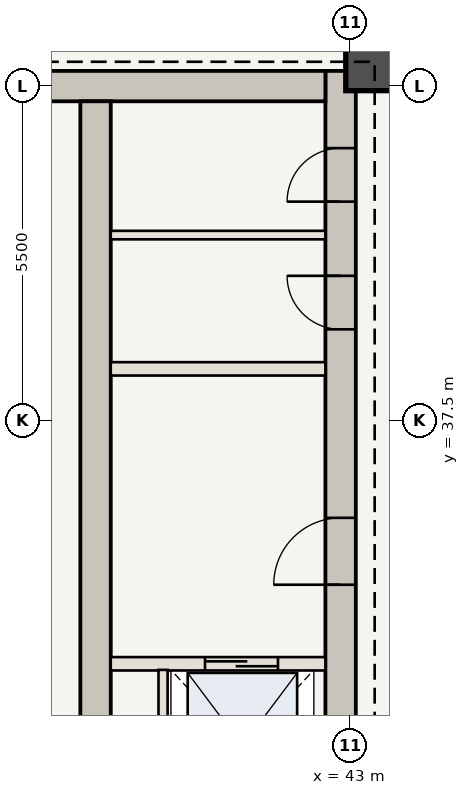
"""IFC4 building model, lengths in metres.
Left out: names, types, materials, properties, quantities, classifications, styles, units other than length and angle.
Written with IfcOpenShell. Run it as: python <this file> out.ifc"""

import sys

from ifc_helpers import new_model, si_unit, direction, frame, frame_2d, origin, origin_2d, place, context, subcontext, project, spatial, rectangle, extrude, element, fill, save


model = new_model("IFC4")
c1 = context("Model", 3, precision=1e-05, world=origin(), true_north=direction((0.0, 1.0)))
c2 = subcontext(c1, "Body", "Model", "MODEL_VIEW")
j1 = project(units=[si_unit("LENGTHUNIT", "METRE"), si_unit("PLANEANGLEUNIT", "RADIAN")], contexts=[c1])
p1 = place(None, origin())
s1 = spatial("IfcSite", under=j1, at=p1, CompositionType="ELEMENT")
p2 = place(p1, origin())
s2 = spatial("IfcBuilding", under=s1, at=p2, CompositionType="ELEMENT")
p3 = place(p2, frame((0.0, 0.0, 233.1)))
s3 = spatial("IfcBuildingStorey", under=s2, at=p3, CompositionType="ELEMENT", Elevation=233.1)
p4 = place(p3, frame((42.84, 30.6, 0.0), z_axis=(0.0, 0.0, 1.0), x_axis=(0.0, 1.0, 0.0)))
e1 = element("IfcWall", 1, at=p4, inside=s3, PredefinedType="SHEAR", context=c2, shape_type="SweptSolid", body=[
    extrude(rectangle(XDim=12.65, YDim=0.5, at=frame_2d((6.325, 0.0))), origin(), (0.0, 0.0, 1.0), 3.85),
])
p5 = place(p4, frame((4.2, 0.0, 0.0)))
e2 = element("IfcOpeningElement", 2, at=p5, cuts=e1, PredefinedType="OPENING", context=c2, shape_type="SweptSolid", body=[
    extrude(rectangle(XDim=1.1, YDim=2.15, at=frame_2d((0.55, 1.075))), frame((0.0, 0.26, 0.0), z_axis=(0.0, -1.0, 0.0), x_axis=(1.0, 0.0, 0.0)), (0.0, 0.0, 1.0), 0.52),
])
p6 = place(p4, frame((8.4, 0.0, 0.0)))
e3 = element("IfcOpeningElement", 3, at=p6, cuts=e1, PredefinedType="OPENING", context=c2, shape_type="SweptSolid", body=[
    extrude(rectangle(XDim=0.88, YDim=2.1, at=frame_2d((0.44, 1.05))), frame((0.0, 0.26, 0.0), z_axis=(0.0, -1.0, 0.0), x_axis=(1.0, 0.0, 0.0)), (0.0, 0.0, 1.0), 0.52),
])
p7 = place(p4, frame((10.5, 0.0, 0.0)))
e4 = element("IfcOpeningElement", 4, at=p7, cuts=e1, PredefinedType="OPENING", context=c2, shape_type="SweptSolid", body=[
    extrude(rectangle(XDim=0.88, YDim=2.1, at=frame_2d((0.44, 1.05))), frame((0.0, 0.26, 0.0), z_axis=(0.0, -1.0, 0.0), x_axis=(1.0, 0.0, 0.0)), (0.0, 0.0, 1.0), 0.52),
])
p8 = place(p3, frame((37.75, 43.0, 0.0), z_axis=(0.0, 0.0, 1.0), x_axis=(1.0, 0.0, 0.0)))
e5 = element("IfcWall", 5, at=p8, inside=s3, PredefinedType="SHEAR", context=c2, shape_type="SweptSolid", body=[
    extrude(rectangle(XDim=4.84, YDim=0.5, at=frame_2d((2.42, 0.0))), origin(), (0.0, 0.0, 1.0), 3.85),
])
p9 = place(p3, frame((38.81, 30.6, 0.0), z_axis=(0.0, 0.0, 1.0), x_axis=(0.0, 1.0, 0.0)))
e6 = element("IfcWall", 6, at=p9, inside=s3, PredefinedType="SHEAR", context=c2, shape_type="SweptSolid", body=[
    extrude(rectangle(XDim=12.15, YDim=0.5, at=frame_2d((6.075, 0.0))), origin(), (0.0, 0.0, 1.0), 3.85),
])
p10 = place(p3, frame((43.35, 43.35, 0.0), z_axis=(0.0, 0.0, 1.0), x_axis=(1.0, 0.0, 0.0)))
e7 = element("IfcColumn", 7, at=p10, inside=s3, PredefinedType="COLUMN", context=c2, shape_type="SweptSolid", body=[
    extrude(rectangle(XDim=0.85, YDim=0.85, at=origin_2d()), origin(), (0.0, 0.0, 1.0), 3.85),
])
p11 = place(p3, frame((39.06, 33.5, 0.0), z_axis=(0.0, 0.0, 1.0), x_axis=(1.0, 0.0, 0.0)))
e8 = element("IfcWall", 8, at=p11, inside=s3, PredefinedType="STANDARD", context=c2, shape_type="SweptSolid", body=[
    extrude(rectangle(XDim=3.53, YDim=0.22, at=frame_2d((1.765, 0.0))), origin(), (0.0, 0.0, 1.0), 3.685),
])
p12 = place(p11, frame((1.55, 0.0, 0.0)))
e9 = element("IfcOpeningElement", 9, at=p12, cuts=e8, PredefinedType="OPENING", context=c2, shape_type="SweptSolid", body=[
    extrude(rectangle(XDim=1.2, YDim=2.2, at=frame_2d((0.6, 1.1))), frame((0.0, 0.12, 0.0), z_axis=(0.0, -1.0, 0.0), x_axis=(1.0, 0.0, 0.0)), (0.0, 0.0, 1.0), 0.24),
])
p13 = place(p3, frame((39.92, 30.75, 0.0), z_axis=(0.0, 0.0, 1.0), x_axis=(0.0, 1.0, 0.0)))
e10 = element("IfcWall", 10, at=p13, inside=s3, PredefinedType="STANDARD", context=c2, shape_type="SweptSolid", body=[
    extrude(rectangle(XDim=2.65, YDim=0.15, at=frame_2d((1.325, 0.0))), origin(), (0.0, 0.0, 1.0), 3.685),
])
p14 = place(p3, frame((39.06, 38.35, 0.0), z_axis=(0.0, 0.0, 1.0), x_axis=(1.0, 0.0, 0.0)))
e11 = element("IfcWall", 11, at=p14, inside=s3, PredefinedType="STANDARD", context=c2, shape_type="SweptSolid", body=[
    extrude(rectangle(XDim=3.53, YDim=0.22, at=frame_2d((1.765, 0.0))), origin(), (0.0, 0.0, 1.0), 3.685),
])
p15 = place(p3, frame((39.06, 40.55, 0.0), z_axis=(0.0, 0.0, 1.0), x_axis=(1.0, 0.0, 0.0)))
e12 = element("IfcWall", 12, at=p15, inside=s3, PredefinedType="STANDARD", context=c2, shape_type="SweptSolid", body=[
    extrude(rectangle(XDim=3.53, YDim=0.14, at=frame_2d((1.765, 0.0))), origin(), (0.0, 0.0, 1.0), 3.685),
])
p16 = place(p5, origin())
e13 = element("IfcDoor", 13, at=p16, inside=s3, OperationType="SINGLE_SWING_LEFT", PredefinedType="DOOR", context=c2, shape_type="SweptSolid", body=[
    extrude(rectangle(XDim=1.1, YDim=2.15, at=frame_2d((0.55, 1.075))), frame((0.0, 0.025, 0.0), z_axis=(0.0, -1.0, 0.0), x_axis=(1.0, 0.0, 0.0)), (0.0, 0.0, 1.0), 0.05),
])
fill(e2, e13)
p17 = place(p6, origin())
e14 = element("IfcDoor", 14, at=p17, inside=s3, OperationType="SINGLE_SWING_RIGHT", PredefinedType="DOOR", context=c2, shape_type="SweptSolid", body=[
    extrude(rectangle(XDim=0.88, YDim=2.1, at=frame_2d((0.44, 1.05))), frame((0.0, 0.025, 0.0), z_axis=(0.0, -1.0, 0.0), x_axis=(1.0, 0.0, 0.0)), (0.0, 0.0, 1.0), 0.05),
])
fill(e3, e14)
p18 = place(p7, origin())
e15 = element("IfcDoor", 15, at=p18, inside=s3, OperationType="SINGLE_SWING_LEFT", PredefinedType="DOOR", context=c2, shape_type="SweptSolid", body=[
    extrude(rectangle(XDim=0.88, YDim=2.1, at=frame_2d((0.44, 1.05))), frame((0.0, 0.025, 0.0), z_axis=(0.0, -1.0, 0.0), x_axis=(1.0, 0.0, 0.0)), (0.0, 0.0, 1.0), 0.05),
])
fill(e4, e15)
p19 = place(p12, origin())
e16 = element("IfcDoor", 16, at=p19, inside=s3, OperationType="DOUBLE_DOOR_SLIDING", PredefinedType="DOOR", context=c2, shape_type="SweptSolid", body=[
    extrude(rectangle(XDim=1.2, YDim=2.2, at=frame_2d((0.6, 1.1))), frame((0.0, 0.025, 0.0), z_axis=(0.0, -1.0, 0.0), x_axis=(1.0, 0.0, 0.0)), (0.0, 0.0, 1.0), 0.05),
])
fill(e9, e16)
save(model, sys.argv[1])
